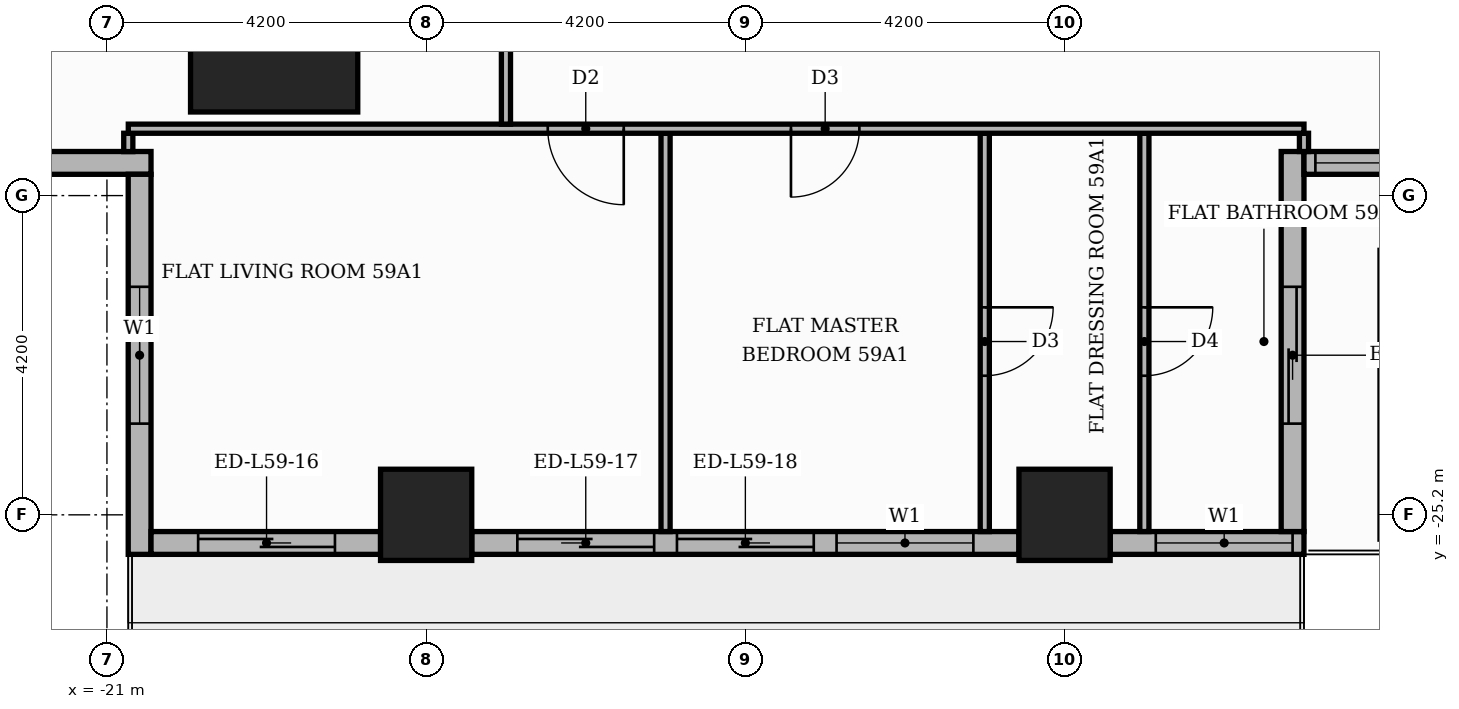
"""IFC4 building model, lengths in metres.
Left out: names, types, materials, properties, quantities, classifications, styles, units other than length and angle.
Written with IfcOpenShell. Run it as: python <this file> out.ifc"""

import sys

from ifc_helpers import new_model, si_unit, direction, frame, frame_2d, origin, origin_2d, place, context, subcontext, project, spatial, rectangle, extrude, element, fill, save


model = new_model("IFC4")
c1 = context("Model", 3, precision=1e-05, world=origin(), true_north=direction((0.0, 1.0)))
c2 = subcontext(c1, "Body", "Model", "MODEL_VIEW")
j1 = project(units=[si_unit("LENGTHUNIT", "METRE"), si_unit("PLANEANGLEUNIT", "RADIAN")], contexts=[c1])
p1 = place(None, origin())
s1 = spatial("IfcSite", under=j1, at=p1, CompositionType="ELEMENT")
p2 = place(p1, origin())
s2 = spatial("IfcBuilding", under=s1, at=p2, CompositionType="ELEMENT")
p3 = place(p2, frame((0.0, 0.0, 248.4)))
s3 = spatial("IfcBuildingStorey", under=s2, at=p3, CompositionType="ELEMENT", Elevation=248.4)
p4 = place(p3, frame((-18.8, -18.8, 0.0), z_axis=(0.0, 0.0, 1.0), x_axis=(1.0, 0.0, 0.0)))
e1 = element("IfcColumn", 1, at=p4, inside=s3, PredefinedType="COLUMN", context=c2, shape_type="SweptSolid", body=[
    extrude(rectangle(XDim=2.2, YDim=2.2, at=origin_2d()), origin(), (0.0, 0.0, 1.0), 3.9),
])
for number, where, z_axis, x_axis in (
    (2, (-8.4, -25.2, 0.0), (0.0, 0.0, 1.0), (1.0, 0.0, 0.0)),
    (3, (-16.8, -25.2, 0.0), (0.0, 0.0, 1.0), (1.0, 0.0, 0.0)),
):
    element("IfcColumn", number, at=place(p3, frame(where, z_axis=z_axis, x_axis=x_axis)), inside=s3, PredefinedType="COLUMN", context=c2, shape_type="SweptSolid", body=[
        extrude(rectangle(XDim=1.2, YDim=1.2, at=origin_2d()), origin(), (0.0, 0.0, 1.0), 3.9),
    ])
p5 = place(p3, frame((-25.42, -20.57, 0.0), z_axis=(0.0, 0.0, 1.0), x_axis=(1.0, 0.0, 0.0)))
e4 = element("IfcWall", 4, at=p5, inside=s3, PredefinedType="STANDARD", context=c2, shape_type="SweptSolid", body=[
    extrude(rectangle(XDim=5.0, YDim=0.3, at=frame_2d((2.5, 0.0))), origin(), (0.0, 0.0, 1.0), 3.48),
])
p6 = place(p5, frame((1.42, 0.0, 0.9)))
e5 = element("IfcOpeningElement", 5, at=p6, cuts=e4, PredefinedType="OPENING", context=c2, shape_type="SweptSolid", body=[
    extrude(rectangle(XDim=1.8, YDim=2.1, at=frame_2d((0.9, 1.05))), frame((0.0, 0.16, 0.0), z_axis=(0.0, -1.0, 0.0), x_axis=(1.0, 0.0, 0.0)), (0.0, 0.0, 1.0), 0.32),
])
p7 = place(p3, frame((-20.57, -20.72, 0.0), z_axis=(0.0, 0.0, 1.0), x_axis=(0.0, -1.0, 0.0)))
e6 = element("IfcWall", 6, at=p7, inside=s3, PredefinedType="STANDARD", context=c2, shape_type="SweptSolid", body=[
    extrude(rectangle(XDim=5.0, YDim=0.3, at=frame_2d((2.5, 0.0))), origin(), (0.0, 0.0, 1.0), 3.48),
])
p8 = place(p7, frame((1.48, 0.0, 0.9)))
e7 = element("IfcOpeningElement", 7, at=p8, cuts=e6, PredefinedType="OPENING", context=c2, shape_type="SweptSolid", body=[
    extrude(rectangle(XDim=1.8, YDim=2.1, at=frame_2d((0.9, 1.05))), frame((0.0, 0.16, 0.0), z_axis=(0.0, -1.0, 0.0), x_axis=(1.0, 0.0, 0.0)), (0.0, 0.0, 1.0), 0.32),
])
p9 = place(p3, frame((-20.42, -25.57, 0.0), z_axis=(0.0, 0.0, 1.0), x_axis=(1.0, 0.0, 0.0)))
e8 = element("IfcWall", 8, at=p9, inside=s3, PredefinedType="STANDARD", context=c2, shape_type="SweptSolid", body=[
    extrude(rectangle(XDim=3.02, YDim=0.3, at=frame_2d((1.51, 0.0))), origin(), (0.0, 0.0, 1.0), 3.48),
])
p10 = place(p9, frame((0.62, 0.0, 0.0)))
e9 = element("IfcOpeningElement", 9, at=p10, cuts=e8, PredefinedType="OPENING", context=c2, shape_type="SweptSolid", body=[
    extrude(rectangle(XDim=1.8, YDim=2.4, at=frame_2d((0.9, 1.2))), frame((0.0, 0.16, 0.0), z_axis=(0.0, -1.0, 0.0), x_axis=(1.0, 0.0, 0.0)), (0.0, 0.0, 1.0), 0.32),
])
p11 = place(p3, frame((-16.2, -25.57, 0.0), z_axis=(0.0, 0.0, 1.0), x_axis=(1.0, 0.0, 0.0)))
e10 = element("IfcWall", 10, at=p11, inside=s3, PredefinedType="STANDARD", context=c2, shape_type="SweptSolid", body=[
    extrude(rectangle(XDim=7.2, YDim=0.3, at=frame_2d((3.6, 0.0))), origin(), (0.0, 0.0, 1.0), 3.48),
])
p12 = place(p11, frame((0.6, 0.0, 0.0)))
e11 = element("IfcOpeningElement", 11, at=p12, cuts=e10, PredefinedType="OPENING", context=c2, shape_type="SweptSolid", body=[
    extrude(rectangle(XDim=1.8, YDim=2.4, at=frame_2d((0.9, 1.2))), frame((0.0, 0.16, 0.0), z_axis=(0.0, -1.0, 0.0), x_axis=(1.0, 0.0, 0.0)), (0.0, 0.0, 1.0), 0.32),
])
p13 = place(p11, frame((2.7, 0.0, 0.0)))
e12 = element("IfcOpeningElement", 12, at=p13, cuts=e10, PredefinedType="OPENING", context=c2, shape_type="SweptSolid", body=[
    extrude(rectangle(XDim=1.8, YDim=2.4, at=frame_2d((0.9, 1.2))), frame((0.0, 0.16, 0.0), z_axis=(0.0, -1.0, 0.0), x_axis=(1.0, 0.0, 0.0)), (0.0, 0.0, 1.0), 0.32),
])
p14 = place(p11, frame((4.8, 0.0, 0.9)))
e13 = element("IfcOpeningElement", 13, at=p14, cuts=e10, PredefinedType="OPENING", context=c2, shape_type="SweptSolid", body=[
    extrude(rectangle(XDim=1.8, YDim=2.1, at=frame_2d((0.9, 1.05))), frame((0.0, 0.16, 0.0), z_axis=(0.0, -1.0, 0.0), x_axis=(1.0, 0.0, 0.0)), (0.0, 0.0, 1.0), 0.32),
])
p15 = place(p3, frame((-7.8, -25.57, 0.0), z_axis=(0.0, 0.0, 1.0), x_axis=(1.0, 0.0, 0.0)))
e14 = element("IfcWall", 14, at=p15, inside=s3, PredefinedType="STANDARD", context=c2, shape_type="SweptSolid", body=[
    extrude(rectangle(XDim=2.55, YDim=0.3, at=frame_2d((1.275, 0.0))), origin(), (0.0, 0.0, 1.0), 3.48),
])
p16 = place(p15, frame((0.6, 0.0, 0.9)))
e15 = element("IfcOpeningElement", 15, at=p16, cuts=e14, PredefinedType="OPENING", context=c2, shape_type="SweptSolid", body=[
    extrude(rectangle(XDim=1.8, YDim=2.1, at=frame_2d((0.9, 1.05))), frame((0.0, 0.16, 0.0), z_axis=(0.0, -1.0, 0.0), x_axis=(1.0, 0.0, 0.0)), (0.0, 0.0, 1.0), 0.32),
])
p17 = place(p3, frame((-5.4, -25.42, 0.0), z_axis=(0.0, 0.0, 1.0), x_axis=(0.0, 1.0, 0.0)))
e16 = element("IfcWall", 16, at=p17, inside=s3, PredefinedType="STANDARD", context=c2, shape_type="SweptSolid", body=[
    extrude(rectangle(XDim=5.0, YDim=0.3, at=frame_2d((2.5, 0.0))), origin(), (0.0, 0.0, 1.0), 3.48),
])
p18 = place(p17, frame((1.42, 0.0, 0.0)))
e17 = element("IfcOpeningElement", 17, at=p18, cuts=e16, PredefinedType="OPENING", context=c2, shape_type="SweptSolid", body=[
    extrude(rectangle(XDim=1.8, YDim=2.4, at=frame_2d((0.9, 1.2))), frame((0.0, 0.16, 0.0), z_axis=(0.0, -1.0, 0.0), x_axis=(1.0, 0.0, 0.0)), (0.0, 0.0, 1.0), 0.32),
])
p19 = place(p3, frame((-5.25, -20.57, 0.0), z_axis=(0.0, 0.0, 1.0), x_axis=(1.0, 0.0, 0.0)))
e18 = element("IfcWall", 18, at=p19, inside=s3, PredefinedType="STANDARD", context=c2, shape_type="SweptSolid", body=[
    extrude(rectangle(XDim=10.8, YDim=0.3, at=frame_2d((5.4, 0.0))), origin(), (0.0, 0.0, 1.0), 3.48),
])
p20 = place(p19, frame((0.15, 0.0, 0.9)))
e19 = element("IfcOpeningElement", 19, at=p20, cuts=e18, PredefinedType="OPENING", context=c2, shape_type="SweptSolid", body=[
    extrude(rectangle(XDim=6.0, YDim=2.1, at=frame_2d((3.0, 1.05))), frame((0.0, 0.16, 0.0), z_axis=(0.0, -1.0, 0.0), x_axis=(1.0, 0.0, 0.0)), (0.0, 0.0, 1.0), 0.32),
])
p21 = place(p19, frame((6.45, 0.0, 0.9)))
e20 = element("IfcOpeningElement", 20, at=p21, cuts=e18, PredefinedType="OPENING", context=c2, shape_type="SweptSolid", body=[
    extrude(rectangle(XDim=3.9, YDim=2.1, at=frame_2d((1.95, 1.05))), frame((0.0, 0.16, 0.0), z_axis=(0.0, -1.0, 0.0), x_axis=(1.0, 0.0, 0.0)), (0.0, 0.0, 1.0), 0.32),
])
p22 = place(p3, frame((-13.65, -25.42, 0.0), z_axis=(0.0, 0.0, 1.0), x_axis=(0.0, 1.0, 0.0)))
e21 = element("IfcWall", 21, at=p22, inside=s3, PredefinedType="PARTITIONING", context=c2, shape_type="SweptSolid", body=[
    extrude(rectangle(XDim=5.24, YDim=0.12, at=frame_2d((2.62, 0.0))), origin(), (0.0, 0.0, 1.0), 3.48),
])
p23 = place(p3, frame((-9.45, -25.42, 0.0), z_axis=(0.0, 0.0, 1.0), x_axis=(0.0, 1.0, 0.0)))
e22 = element("IfcWall", 22, at=p23, inside=s3, PredefinedType="PARTITIONING", context=c2, shape_type="SweptSolid", body=[
    extrude(rectangle(XDim=5.24, YDim=0.12, at=frame_2d((2.62, 0.0))), origin(), (0.0, 0.0, 1.0), 3.48),
])
p24 = place(p23, frame((2.05, 0.0, 0.0)))
e23 = element("IfcOpeningElement", 23, at=p24, cuts=e22, PredefinedType="OPENING", context=c2, shape_type="SweptSolid", body=[
    extrude(rectangle(XDim=0.9, YDim=2.1, at=frame_2d((0.45, 1.05))), frame((0.0, 0.07, 0.0), z_axis=(0.0, -1.0, 0.0), x_axis=(1.0, 0.0, 0.0)), (0.0, 0.0, 1.0), 0.14),
])
p25 = place(p3, frame((-7.35, -25.42, 0.0), z_axis=(0.0, 0.0, 1.0), x_axis=(0.0, 1.0, 0.0)))
e24 = element("IfcWall", 24, at=p25, inside=s3, PredefinedType="PARTITIONING", context=c2, shape_type="SweptSolid", body=[
    extrude(rectangle(XDim=5.24, YDim=0.12, at=frame_2d((2.62, 0.0))), origin(), (0.0, 0.0, 1.0), 3.48),
])
p26 = place(p25, frame((2.05, 0.0, 0.0)))
e25 = element("IfcOpeningElement", 25, at=p26, cuts=e24, PredefinedType="OPENING", context=c2, shape_type="SweptSolid", body=[
    extrude(rectangle(XDim=0.9, YDim=2.1, at=frame_2d((0.45, 1.05))), frame((0.0, 0.07, 0.0), z_axis=(0.0, -1.0, 0.0), x_axis=(1.0, 0.0, 0.0)), (0.0, 0.0, 1.0), 0.14),
])
p27 = place(p3, frame((-20.719, -20.421, 0.0), z_axis=(0.0, 0.0, 1.0), x_axis=(0.0, 1.0, 0.0)))
e26 = element("IfcWall", 26, at=p27, inside=s3, PredefinedType="PARTITIONING", context=c2, shape_type="SweptSolid", body=[
    extrude(rectangle(XDim=0.241, YDim=0.12, at=frame_2d((0.121, 0.0))), origin(), (0.0, 0.0, 1.0), 3.48),
])
p28 = place(p3, frame((-5.25, -20.42, 0.0), z_axis=(0.0, 0.0, 1.0), x_axis=(0.0, 1.0, 0.0)))
e27 = element("IfcWall", 27, at=p28, inside=s3, PredefinedType="PARTITIONING", context=c2, shape_type="SweptSolid", body=[
    extrude(rectangle(XDim=0.24, YDim=0.12, at=frame_2d((0.12, 0.0))), origin(), (0.0, 0.0, 1.0), 3.48),
])
p29 = place(p3, frame((-20.719, -20.12, 0.0), z_axis=(0.0, 0.0, 1.0), x_axis=(1.0, 0.0, 0.0)))
e28 = element("IfcWall", 28, at=p29, inside=s3, PredefinedType="PARTITIONING", context=c2, shape_type="SweptSolid", body=[
    extrude(rectangle(XDim=15.469, YDim=0.12, at=frame_2d((7.734, 0.0))), origin(), (0.0, 0.0, 1.0), 3.48),
])
p30 = place(p29, frame((5.519, 0.0, 0.0)))
e29 = element("IfcOpeningElement", 29, at=p30, cuts=e28, PredefinedType="OPENING", context=c2, shape_type="SweptSolid", body=[
    extrude(rectangle(XDim=1.0, YDim=2.1, at=frame_2d((0.5, 1.05))), frame((0.0, 0.07, 0.0), z_axis=(0.0, -1.0, 0.0), x_axis=(1.0, 0.0, 0.0)), (0.0, 0.0, 1.0), 0.14),
])
p31 = place(p29, frame((8.719, 0.0, 0.0)))
e30 = element("IfcOpeningElement", 30, at=p31, cuts=e28, PredefinedType="OPENING", context=c2, shape_type="SweptSolid", body=[
    extrude(rectangle(XDim=0.9, YDim=2.1, at=frame_2d((0.45, 1.05))), frame((0.0, 0.07, 0.0), z_axis=(0.0, -1.0, 0.0), x_axis=(1.0, 0.0, 0.0)), (0.0, 0.0, 1.0), 0.14),
])
p32 = place(p3, frame((-15.75, -20.06, 0.0), z_axis=(0.0, 0.0, 1.0), x_axis=(0.0, 1.0, 0.0)))
e31 = element("IfcWall", 31, at=p32, inside=s3, PredefinedType="PARTITIONING", context=c2, shape_type="SweptSolid", body=[
    extrude(rectangle(XDim=6.31, YDim=0.12, at=frame_2d((3.155, 0.0))), origin(), (0.0, 0.0, 1.0), 3.48),
])
p33 = place(p32, frame((2.725, 0.0, 0.0)))
e32 = element("IfcOpeningElement", 32, at=p33, cuts=e31, PredefinedType="OPENING", context=c2, shape_type="SweptSolid", body=[
    extrude(rectangle(XDim=0.9, YDim=2.1, at=frame_2d((0.45, 1.05))), frame((0.0, 0.07, 0.0), z_axis=(0.0, -1.0, 0.0), x_axis=(1.0, 0.0, 0.0)), (0.0, 0.0, 1.0), 0.14),
])
p34 = place(p8, origin())
e33 = element("IfcWindow", 33, at=p34, inside=s3, PartitioningType="SINGLE_PANEL", PredefinedType="WINDOW", context=c2, shape_type="SweptSolid", body=[
    extrude(rectangle(XDim=1.8, YDim=2.1, at=frame_2d((0.9, 1.05))), frame((0.0, 0.03, 0.0), z_axis=(0.0, -1.0, 0.0), x_axis=(1.0, 0.0, 0.0)), (0.0, 0.0, 1.0), 0.06),
])
fill(e7, e33)
p35 = place(p10, origin())
e34 = element("IfcDoor", 34, at=p35, inside=s3, OperationType="SLIDING_TO_RIGHT", PredefinedType="DOOR", context=c2, shape_type="SweptSolid", body=[
    extrude(rectangle(XDim=1.8, YDim=2.4, at=frame_2d((0.9, 1.2))), frame((0.0, 0.025, 0.0), z_axis=(0.0, -1.0, 0.0), x_axis=(1.0, 0.0, 0.0)), (0.0, 0.0, 1.0), 0.05),
])
fill(e9, e34)
p36 = place(p12, origin())
e35 = element("IfcDoor", 35, at=p36, inside=s3, OperationType="SLIDING_TO_LEFT", PredefinedType="DOOR", context=c2, shape_type="SweptSolid", body=[
    extrude(rectangle(XDim=1.8, YDim=2.4, at=frame_2d((0.9, 1.2))), frame((0.0, 0.025, 0.0), z_axis=(0.0, -1.0, 0.0), x_axis=(1.0, 0.0, 0.0)), (0.0, 0.0, 1.0), 0.05),
])
fill(e11, e35)
p37 = place(p13, origin())
e36 = element("IfcDoor", 36, at=p37, inside=s3, OperationType="SLIDING_TO_RIGHT", PredefinedType="DOOR", context=c2, shape_type="SweptSolid", body=[
    extrude(rectangle(XDim=1.8, YDim=2.4, at=frame_2d((0.9, 1.2))), frame((0.0, 0.025, 0.0), z_axis=(0.0, -1.0, 0.0), x_axis=(1.0, 0.0, 0.0)), (0.0, 0.0, 1.0), 0.05),
])
fill(e12, e36)
p38 = place(p14, origin())
e37 = element("IfcWindow", 37, at=p38, inside=s3, PartitioningType="SINGLE_PANEL", PredefinedType="WINDOW", context=c2, shape_type="SweptSolid", body=[
    extrude(rectangle(XDim=1.8, YDim=2.1, at=frame_2d((0.9, 1.05))), frame((0.0, 0.03, 0.0), z_axis=(0.0, -1.0, 0.0), x_axis=(1.0, 0.0, 0.0)), (0.0, 0.0, 1.0), 0.06),
])
fill(e13, e37)
p39 = place(p16, origin())
e38 = element("IfcWindow", 38, at=p39, inside=s3, PartitioningType="SINGLE_PANEL", PredefinedType="WINDOW", context=c2, shape_type="SweptSolid", body=[
    extrude(rectangle(XDim=1.8, YDim=2.1, at=frame_2d((0.9, 1.05))), frame((0.0, 0.03, 0.0), z_axis=(0.0, -1.0, 0.0), x_axis=(1.0, 0.0, 0.0)), (0.0, 0.0, 1.0), 0.06),
])
fill(e15, e38)
p40 = place(p18, origin())
e39 = element("IfcDoor", 39, at=p40, inside=s3, OperationType="SLIDING_TO_LEFT", PredefinedType="DOOR", context=c2, shape_type="SweptSolid", body=[
    extrude(rectangle(XDim=1.8, YDim=2.4, at=frame_2d((0.9, 1.2))), frame((0.0, 0.025, 0.0), z_axis=(0.0, -1.0, 0.0), x_axis=(1.0, 0.0, 0.0)), (0.0, 0.0, 1.0), 0.05),
])
fill(e17, e39)
p41 = place(p20, origin())
e40 = element("IfcWindow", 40, at=p41, inside=s3, PartitioningType="SINGLE_PANEL", PredefinedType="WINDOW", context=c2, shape_type="SweptSolid", body=[
    extrude(rectangle(XDim=6.0, YDim=2.1, at=frame_2d((3.0, 1.05))), frame((0.0, 0.03, 0.0), z_axis=(0.0, -1.0, 0.0), x_axis=(1.0, 0.0, 0.0)), (0.0, 0.0, 1.0), 0.06),
])
fill(e19, e40)
p42 = place(p30, frame((1.0, 0.0, 0.0), z_axis=(0.0, 0.0, 1.0), x_axis=(-1.0, 0.0, 0.0)))
e41 = element("IfcDoor", 41, at=p42, inside=s3, OperationType="SINGLE_SWING_RIGHT", PredefinedType="DOOR", context=c2, shape_type="SweptSolid", body=[
    extrude(rectangle(XDim=1.0, YDim=2.1, at=frame_2d((0.5, 1.05))), frame((0.0, 0.025, 0.0), z_axis=(0.0, -1.0, 0.0), x_axis=(1.0, 0.0, 0.0)), (0.0, 0.0, 1.0), 0.05),
])
fill(e29, e41)
p43 = place(p31, frame((0.9, 0.0, 0.0), z_axis=(0.0, 0.0, 1.0), x_axis=(-1.0, 0.0, 0.0)))
e42 = element("IfcDoor", 42, at=p43, inside=s3, OperationType="SINGLE_SWING_LEFT", PredefinedType="DOOR", context=c2, shape_type="SweptSolid", body=[
    extrude(rectangle(XDim=0.9, YDim=2.1, at=frame_2d((0.45, 1.05))), frame((0.0, 0.025, 0.0), z_axis=(0.0, -1.0, 0.0), x_axis=(1.0, 0.0, 0.0)), (0.0, 0.0, 1.0), 0.05),
])
fill(e30, e42)
p44 = place(p24, frame((0.9, 0.0, 0.0), z_axis=(0.0, 0.0, 1.0), x_axis=(-1.0, 0.0, 0.0)))
e43 = element("IfcDoor", 43, at=p44, inside=s3, OperationType="SINGLE_SWING_RIGHT", PredefinedType="DOOR", context=c2, shape_type="SweptSolid", body=[
    extrude(rectangle(XDim=0.9, YDim=2.1, at=frame_2d((0.45, 1.05))), frame((0.0, 0.025, 0.0), z_axis=(0.0, -1.0, 0.0), x_axis=(1.0, 0.0, 0.0)), (0.0, 0.0, 1.0), 0.05),
])
fill(e23, e43)
p45 = place(p26, frame((0.9, 0.0, 0.0), z_axis=(0.0, 0.0, 1.0), x_axis=(-1.0, 0.0, 0.0)))
e44 = element("IfcDoor", 44, at=p45, inside=s3, OperationType="SINGLE_SWING_RIGHT", PredefinedType="DOOR", context=c2, shape_type="SweptSolid", body=[
    extrude(rectangle(XDim=0.9, YDim=2.1, at=frame_2d((0.45, 1.05))), frame((0.0, 0.025, 0.0), z_axis=(0.0, -1.0, 0.0), x_axis=(1.0, 0.0, 0.0)), (0.0, 0.0, 1.0), 0.05),
])
fill(e25, e44)
save(model, sys.argv[1])
